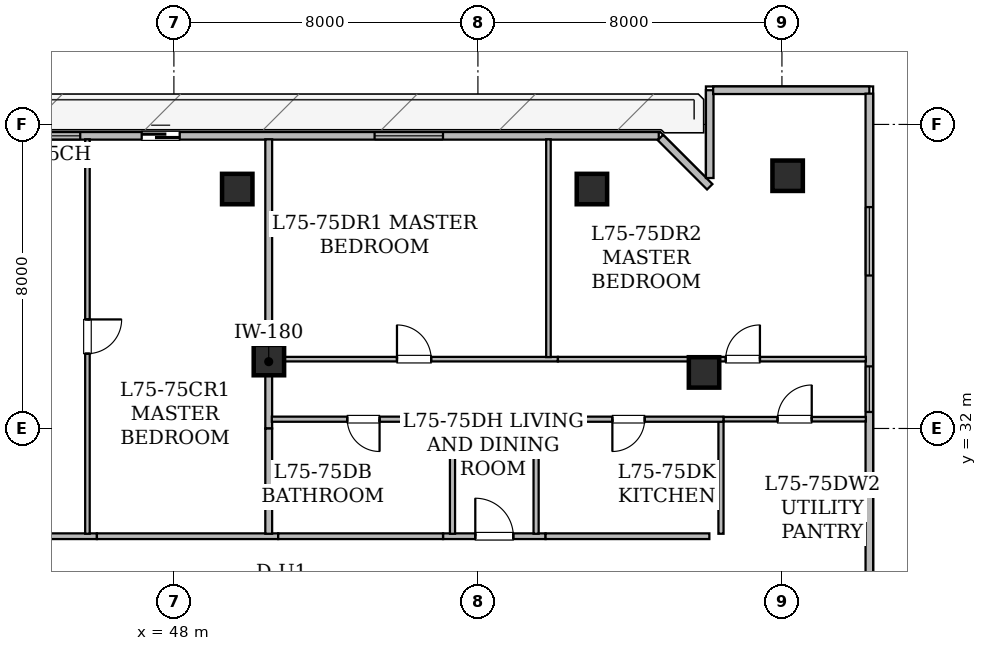
"""IFC4 building model, lengths in metres.
Left out: names, types, materials, properties, quantities, classifications, styles, units other than length and angle.
Written with IfcOpenShell. Run it as: python <this file> out.ifc"""

import sys

from ifc_helpers import new_model, si_unit, direction, frame, frame_2d, origin, origin_2d, place, context, subcontext, project, spatial, rectangle, hollow_rectangle, extrude, element, fill, save


model = new_model("IFC4")
c1 = context("Model", 3, precision=1e-05, world=origin(), true_north=direction((0.0, 1.0)))
c2 = subcontext(c1, "Body", "Model", "MODEL_VIEW")
j1 = project(units=[si_unit("LENGTHUNIT", "METRE"), si_unit("PLANEANGLEUNIT", "RADIAN")], contexts=[c1])
p1 = place(None, origin())
s1 = spatial("IfcSite", under=j1, at=p1, CompositionType="ELEMENT")
p2 = place(p1, origin())
s2 = spatial("IfcBuilding", under=s1, at=p2, CompositionType="ELEMENT")
p3 = place(p2, frame((0.0, 0.0, 294.65)))
s3 = spatial("IfcBuildingStorey", under=s2, at=p3, CompositionType="ELEMENT", Elevation=294.65)
for number, where, z_axis, x_axis in (
    (1, (49.667, 38.3, 0.025), (0.0, 0.0, 1.0), (1.0, 0.0, 0.0)),
    (2, (59.0, 38.3, 0.025), (0.0, 0.0, 1.0), (1.0, 0.0, 0.0)),
    (3, (61.95, 33.475, 0.025), (0.0, 0.0, 1.0), (1.0, 0.0, 0.0)),
):
    element("IfcColumn", number, at=place(p3, frame(where, z_axis=z_axis, x_axis=x_axis)), inside=s3, PredefinedType="COLUMN", context=c2, shape_type="SweptSolid", body=[
        extrude(hollow_rectangle(XDim=0.8, YDim=0.8, WallThickness=0.04, at=origin_2d()), origin(), (0.0, 0.0, 1.0), 4.175),
    ])
p4 = place(p3, frame((50.5, 33.8, 0.0), z_axis=(0.0, 0.0, 1.0), x_axis=(1.0, 0.0, 0.0)))
e4 = element("IfcColumn", 4, at=p4, inside=s3, PredefinedType="COLUMN", context=c2, shape_type="SweptSolid", body=[
    extrude(hollow_rectangle(XDim=0.8, YDim=0.8, WallThickness=0.04, at=origin_2d()), origin(), (0.0, 0.0, 1.0), 4.2),
])
p5 = place(p3, frame((64.15, 38.65, 0.025), z_axis=(0.0, 0.0, 1.0), x_axis=(1.0, 0.0, 0.0)))
e5 = element("IfcColumn", 5, at=p5, inside=s3, PredefinedType="COLUMN", context=c2, shape_type="SweptSolid", body=[
    extrude(hollow_rectangle(XDim=0.8, YDim=0.8, WallThickness=0.04, at=origin_2d()), origin(), (0.0, 0.0, 1.0), 4.175),
])
p6 = place(p3, frame((29.302, 39.7, 0.0), z_axis=(0.0, 0.0, 1.0), x_axis=(1.0, 0.0, 0.0)))
e6 = element("IfcWall", 6, at=p6, inside=s3, PredefinedType="STANDARD", context=c2, shape_type="SweptSolid", body=[
    extrude(rectangle(XDim=31.457, YDim=0.2, at=frame_2d((15.729, 0.0))), origin(), (0.0, 0.0, 1.0), 3.95),
])
p7 = place(p6, frame((17.85, 0.0, 0.0)))
e7 = element("IfcOpeningElement", 7, at=p7, cuts=e6, PredefinedType="OPENING", context=c2, shape_type="SweptSolid", body=[
    extrude(rectangle(XDim=1.0, YDim=2.15, at=frame_2d((0.5, 1.075))), frame((0.0, 0.11, 0.0), z_axis=(0.0, -1.0, 0.0), x_axis=(1.0, 0.0, 0.0)), (0.0, 0.0, 1.0), 0.22),
])
p8 = place(p6, frame((15.033, 0.0, 0.78)))
e8 = element("IfcOpeningElement", 8, at=p8, cuts=e6, PredefinedType="OPENING", context=c2, shape_type="SweptSolid", body=[
    extrude(rectangle(XDim=1.2, YDim=1.5, at=frame_2d((0.6, 0.75))), frame((0.0, 0.11, 0.0), z_axis=(0.0, -1.0, 0.0), x_axis=(1.0, 0.0, 0.0)), (0.0, 0.0, 1.0), 0.22),
])
p9 = place(p6, frame((23.979, 0.0, 0.85)))
e9 = element("IfcOpeningElement", 9, at=p9, cuts=e6, PredefinedType="OPENING", context=c2, shape_type="SweptSolid", body=[
    extrude(rectangle(XDim=1.8, YDim=0.92, at=frame_2d((0.9, 0.46))), frame((0.0, 0.11, 0.0), z_axis=(0.0, -1.0, 0.0), x_axis=(1.0, 0.0, 0.0)), (0.0, 0.0, 1.0), 0.22),
])
p10 = place(p3, frame((60.803, 39.656, 0.0), z_axis=(0.0, 0.0, 1.0), x_axis=(0.707106781187, -0.707106781187, 0.0)))
e10 = element("IfcWall", 10, at=p10, inside=s3, PredefinedType="STANDARD", context=c2, shape_type="SweptSolid", body=[
    extrude(rectangle(XDim=1.834, YDim=0.2, at=frame_2d((0.917, 0.0))), origin(), (0.0, 0.0, 1.0), 3.95),
])
p11 = place(p3, frame((62.1, 38.59, 0.0), z_axis=(0.0, 0.0, 1.0), x_axis=(0.0, 1.0, 0.0)))
e11 = element("IfcWall", 11, at=p11, inside=s3, PredefinedType="STANDARD", context=c2, shape_type="SweptSolid", body=[
    extrude(rectangle(XDim=2.31, YDim=0.2, at=frame_2d((1.155, 0.0))), origin(), (0.0, 0.0, 1.0), 3.95),
])
p12 = place(p3, frame((62.19, 40.9, 0.0), z_axis=(0.0, 0.0, 1.0), x_axis=(1.0, 0.0, 0.0)))
e12 = element("IfcWall", 12, at=p12, inside=s3, PredefinedType="STANDARD", context=c2, shape_type="SweptSolid", body=[
    extrude(rectangle(XDim=4.11, YDim=0.2, at=frame_2d((2.055, 0.0))), origin(), (0.0, 0.0, 1.0), 3.95),
])
p13 = place(p3, frame((66.3, 40.81, 0.0), z_axis=(0.0, 0.0, 1.0), x_axis=(0.0, -1.0, 0.0)))
e13 = element("IfcWall", 13, at=p13, inside=s3, PredefinedType="STANDARD", context=c2, shape_type="SweptSolid", body=[
    extrude(rectangle(XDim=25.71, YDim=0.2, at=frame_2d((12.855, 0.0))), origin(), (0.0, 0.0, 1.0), 3.95),
])
p14 = place(p13, frame((14.784, 0.0, 0.85)))
e14 = element("IfcOpeningElement", 14, at=p14, cuts=e13, PredefinedType="OPENING", context=c2, shape_type="SweptSolid", body=[
    extrude(rectangle(XDim=1.8, YDim=0.92, at=frame_2d((0.9, 0.46))), frame((0.0, 0.11, 0.0), z_axis=(0.0, -1.0, 0.0), x_axis=(1.0, 0.0, 0.0)), (0.0, 0.0, 1.0), 0.22),
])
p15 = place(p13, frame((17.584, 0.0, 0.78)))
e15 = element("IfcOpeningElement", 15, at=p15, cuts=e13, PredefinedType="OPENING", context=c2, shape_type="SweptSolid", body=[
    extrude(rectangle(XDim=1.2, YDim=1.5, at=frame_2d((0.6, 0.75))), frame((0.0, 0.11, 0.0), z_axis=(0.0, -1.0, 0.0), x_axis=(1.0, 0.0, 0.0)), (0.0, 0.0, 1.0), 0.22),
])
p16 = place(p13, frame((21.05, 0.0, 0.85)))
e16 = element("IfcOpeningElement", 16, at=p16, cuts=e13, PredefinedType="OPENING", context=c2, shape_type="SweptSolid", body=[
    extrude(rectangle(XDim=1.8, YDim=0.92, at=frame_2d((0.9, 0.46))), frame((0.0, 0.11, 0.0), z_axis=(0.0, -1.0, 0.0), x_axis=(1.0, 0.0, 0.0)), (0.0, 0.0, 1.0), 0.22),
])
p17 = place(p13, frame((7.176, 0.0, 0.78)))
e17 = element("IfcOpeningElement", 17, at=p17, cuts=e13, PredefinedType="OPENING", context=c2, shape_type="SweptSolid", body=[
    extrude(rectangle(XDim=1.2, YDim=1.5, at=frame_2d((0.6, 0.75))), frame((0.0, 0.11, 0.0), z_axis=(0.0, -1.0, 0.0), x_axis=(1.0, 0.0, 0.0)), (0.0, 0.0, 1.0), 0.22),
])
p18 = place(p13, frame((2.985, 0.0, 0.85)))
e18 = element("IfcOpeningElement", 18, at=p18, cuts=e13, PredefinedType="OPENING", context=c2, shape_type="SweptSolid", body=[
    extrude(rectangle(XDim=1.8, YDim=0.92, at=frame_2d((0.9, 0.46))), frame((0.0, 0.11, 0.0), z_axis=(0.0, -1.0, 0.0), x_axis=(1.0, 0.0, 0.0)), (0.0, 0.0, 1.0), 0.22),
])
p19 = place(p3, frame((43.896, 29.165, 0.0), z_axis=(0.0, 0.0, 1.0), x_axis=(1.0, 0.0, 0.0)))
e19 = element("IfcWall", 19, at=p19, inside=s3, PredefinedType="STANDARD", context=c2, shape_type="SweptSolid", body=[
    extrude(rectangle(XDim=2.078, YDim=0.15, at=frame_2d((1.039, 0.0))), origin(), (0.0, 0.0, 1.0), 3.95),
])
p20 = place(p3, frame((45.974, 29.165, 0.0), z_axis=(0.0, 0.0, 1.0), x_axis=(1.0, 0.0, 0.0)))
e20 = element("IfcWall", 20, at=p20, inside=s3, PredefinedType="STANDARD", context=c2, shape_type="SweptSolid", body=[
    extrude(rectangle(XDim=4.77, YDim=0.15, at=frame_2d((2.385, 0.0))), origin(), (0.0, 0.0, 1.0), 3.245),
])
p21 = place(p3, frame((55.082, 29.165, 0.0), z_axis=(0.0, 0.0, 1.0), x_axis=(1.0, 0.0, 0.0)))
e21 = element("IfcWall", 21, at=p21, inside=s3, PredefinedType="STANDARD", context=c2, shape_type="SweptSolid", body=[
    extrude(rectangle(XDim=2.698, YDim=0.15, at=frame_2d((1.349, 0.0))), origin(), (0.0, 0.0, 1.0), 3.95),
])
p22 = place(p21, frame((0.849, 0.0, 0.0)))
e22 = element("IfcOpeningElement", 22, at=p22, cuts=e21, PredefinedType="OPENING", context=c2, shape_type="SweptSolid", body=[
    extrude(rectangle(XDim=1.0, YDim=2.15, at=frame_2d((0.5, 1.075))), frame((0.0, 0.085, 0.0), z_axis=(0.0, -1.0, 0.0), x_axis=(1.0, 0.0, 0.0)), (0.0, 0.0, 1.0), 0.17),
])
p23 = place(p3, frame((50.744, 29.165, 0.0), z_axis=(0.0, 0.0, 1.0), x_axis=(1.0, 0.0, 0.0)))
e23 = element("IfcWall", 23, at=p23, inside=s3, PredefinedType="STANDARD", context=c2, shape_type="SweptSolid", body=[
    extrude(rectangle(XDim=4.338, YDim=0.15, at=frame_2d((2.169, 0.0))), origin(), (0.0, 0.0, 1.0), 3.95),
])
p24 = place(p3, frame((57.78, 29.165, 0.0), z_axis=(0.0, 0.0, 1.0), x_axis=(1.0, 0.0, 0.0)))
e24 = element("IfcWall", 24, at=p24, inside=s3, PredefinedType="STANDARD", context=c2, shape_type="SweptSolid", body=[
    extrude(rectangle(XDim=4.31, YDim=0.15, at=frame_2d((2.155, 0.0))), origin(), (0.0, 0.0, 1.0), 3.407),
])
p25 = place(p3, frame((45.725, 39.608, 0.0), z_axis=(0.0, 0.0, 1.0), x_axis=(0.0, -1.0, 0.0)))
e25 = element("IfcWall", 25, at=p25, inside=s3, PredefinedType="PARTITIONING", context=c2, shape_type="SweptSolid", body=[
    extrude(rectangle(XDim=10.378, YDim=0.12, at=frame_2d((5.189, 0.0))), origin(), (0.0, 0.0, 1.0), 3.245),
])
p26 = place(p25, frame((4.739, 0.0, 0.0)))
e26 = element("IfcOpeningElement", 26, at=p26, cuts=e25, PredefinedType="OPENING", context=c2, shape_type="SweptSolid", body=[
    extrude(rectangle(XDim=0.9, YDim=2.1, at=frame_2d((0.45, 1.05))), frame((0.0, 0.07, 0.0), z_axis=(0.0, -1.0, 0.0), x_axis=(1.0, 0.0, 0.0)), (0.0, 0.0, 1.0), 0.14),
])
p27 = place(p3, frame((50.495, 34.068, 0.0), z_axis=(0.0, 0.0, 1.0), x_axis=(0.0, -1.0, 0.0)))
e27 = element("IfcWall", 27, at=p27, inside=s3, PredefinedType="STANDARD", context=c2, shape_type="SweptSolid", body=[
    extrude(rectangle(XDim=2.069, YDim=0.18, at=frame_2d((1.035, 0.0))), origin(), (0.0, 0.0, 1.0), 3.245),
])
p28 = place(p3, frame((50.495, 31.999, 0.0), z_axis=(0.0, 0.0, 1.0), x_axis=(0.0, -1.0, 0.0)))
e28 = element("IfcWall", 28, at=p28, inside=s3, PredefinedType="STANDARD", context=c2, shape_type="SweptSolid", body=[
    extrude(rectangle(XDim=2.769, YDim=0.18, at=frame_2d((1.385, 0.0))), origin(), (0.0, 0.0, 1.0), 3.245),
])
p29 = place(p3, frame((50.495, 39.608, 0.0), z_axis=(0.0, 0.0, 1.0), x_axis=(0.0, -1.0, 0.0)))
e29 = element("IfcWall", 29, at=p29, inside=s3, PredefinedType="STANDARD", context=c2, shape_type="SweptSolid", body=[
    extrude(rectangle(XDim=5.54, YDim=0.18, at=frame_2d((2.77, 0.0))), origin(), (0.0, 0.0, 1.0), 3.245),
])
p30 = place(p3, frame((62.461, 32.244, 0.0), z_axis=(0.0, 0.0, 1.0), x_axis=(1.0, 0.0, 0.0)))
e30 = element("IfcWall", 30, at=p30, inside=s3, PredefinedType="PARTITIONING", context=c2, shape_type="SweptSolid", body=[
    extrude(rectangle(XDim=3.747, YDim=0.12, at=frame_2d((1.874, 0.0))), origin(), (0.0, 0.0, 1.0), 3.245),
])
p31 = place(p30, frame((1.423, 0.0, 0.0)))
e31 = element("IfcOpeningElement", 31, at=p31, cuts=e30, PredefinedType="OPENING", context=c2, shape_type="SweptSolid", body=[
    extrude(rectangle(XDim=0.9, YDim=2.1, at=frame_2d((0.45, 1.05))), frame((0.0, 0.07, 0.0), z_axis=(0.0, -1.0, 0.0), x_axis=(1.0, 0.0, 0.0)), (0.0, 0.0, 1.0), 0.14),
])
p32 = place(p3, frame((62.396, 29.23, 0.0), z_axis=(0.0, 0.0, 1.0), x_axis=(0.0, 1.0, 0.0)))
e32 = element("IfcWall", 32, at=p32, inside=s3, PredefinedType="PARTITIONING", context=c2, shape_type="SweptSolid", body=[
    extrude(rectangle(XDim=2.949, YDim=0.135, at=frame_2d((1.475, 0.0))), origin(), (0.0, 0.0, 1.0), 3.95),
])
p33 = place(p3, frame((55.331, 29.23, 0.0), z_axis=(0.0, 0.0, 1.0), x_axis=(0.0, 1.0, 0.0)))
e33 = element("IfcWall", 33, at=p33, inside=s3, PredefinedType="PARTITIONING", context=c2, shape_type="SweptSolid", body=[
    extrude(rectangle(XDim=3.079, YDim=0.135, at=frame_2d((1.54, 0.0))), origin(), (0.0, 0.0, 1.0), 3.95),
])
p34 = place(p3, frame((55.396, 32.244, 0.0), z_axis=(0.0, 0.0, 1.0), x_axis=(-1.0, 0.0, 0.0)))
e34 = element("IfcWall", 34, at=p34, inside=s3, PredefinedType="PARTITIONING", context=c2, shape_type="SweptSolid", body=[
    extrude(rectangle(XDim=4.819, YDim=0.135, at=frame_2d((2.41, 0.0))), origin(), (0.0, 0.0, 1.0), 3.245),
])
p35 = place(p34, frame((1.984, 0.0, 0.0)))
e35 = element("IfcOpeningElement", 35, at=p35, cuts=e34, PredefinedType="OPENING", context=c2, shape_type="SweptSolid", body=[
    extrude(rectangle(XDim=0.85, YDim=2.1, at=frame_2d((0.425, 1.05))), frame((0.0, 0.077, 0.0), z_axis=(0.0, -1.0, 0.0), x_axis=(1.0, 0.0, 0.0)), (0.0, 0.0, 1.0), 0.155),
])
p36 = place(p3, frame((62.461, 32.244, 0.0), z_axis=(0.0, 0.0, 1.0), x_axis=(-1.0, 0.0, 0.0)))
e36 = element("IfcWall", 36, at=p36, inside=s3, PredefinedType="PARTITIONING", context=c2, shape_type="SweptSolid", body=[
    extrude(rectangle(XDim=4.995, YDim=0.135, at=frame_2d((2.498, 0.0))), origin(), (0.0, 0.0, 1.0), 3.407),
])
p37 = place(p36, frame((2.073, 0.0, 0.0)))
e37 = element("IfcOpeningElement", 37, at=p37, cuts=e36, PredefinedType="OPENING", context=c2, shape_type="SweptSolid", body=[
    extrude(rectangle(XDim=0.85, YDim=2.1, at=frame_2d((0.425, 1.05))), frame((0.0, 0.077, 0.0), z_axis=(0.0, -1.0, 0.0), x_axis=(1.0, 0.0, 0.0)), (0.0, 0.0, 1.0), 0.155),
])
p38 = place(p3, frame((57.531, 32.309, 0.0), z_axis=(0.0, 0.0, 1.0), x_axis=(0.0, -1.0, 0.0)))
e38 = element("IfcWall", 38, at=p38, inside=s3, PredefinedType="PARTITIONING", context=c2, shape_type="SweptSolid", body=[
    extrude(rectangle(XDim=3.079, YDim=0.135, at=frame_2d((1.54, 0.0))), origin(), (0.0, 0.0, 1.0), 3.95),
])
p39 = place(p3, frame((50.577, 33.824, 0.0), z_axis=(0.0, 0.0, 1.0), x_axis=(1.0, 0.0, 0.0)))
e39 = element("IfcWall", 39, at=p39, inside=s3, PredefinedType="PARTITIONING", context=c2, shape_type="SweptSolid", body=[
    extrude(rectangle(XDim=7.528, YDim=0.12, at=frame_2d((3.764, 0.0))), origin(), (0.0, 0.0, 1.0), 3.245),
])
p40 = place(p39, frame((3.293, 0.0, 0.0)))
e40 = element("IfcOpeningElement", 40, at=p40, cuts=e39, PredefinedType="OPENING", context=c2, shape_type="SweptSolid", body=[
    extrude(rectangle(XDim=0.9, YDim=2.1, at=frame_2d((0.45, 1.05))), frame((0.0, 0.07, 0.0), z_axis=(0.0, -1.0, 0.0), x_axis=(1.0, 0.0, 0.0)), (0.0, 0.0, 1.0), 0.14),
])
p41 = place(p3, frame((58.105, 33.824, 0.0), z_axis=(0.0, 0.0, 1.0), x_axis=(1.0, 0.0, 0.0)))
e41 = element("IfcWall", 41, at=p41, inside=s3, PredefinedType="PARTITIONING", context=c2, shape_type="SweptSolid", body=[
    extrude(rectangle(XDim=8.103, YDim=0.12, at=frame_2d((4.052, 0.0))), origin(), (0.0, 0.0, 1.0), 3.245),
])
p42 = place(p41, frame((4.416, 0.0, 0.0)))
e42 = element("IfcOpeningElement", 42, at=p42, cuts=e41, PredefinedType="OPENING", context=c2, shape_type="SweptSolid", body=[
    extrude(rectangle(XDim=0.9, YDim=2.1, at=frame_2d((0.45, 1.05))), frame((0.0, 0.07, 0.0), z_axis=(0.0, -1.0, 0.0), x_axis=(1.0, 0.0, 0.0)), (0.0, 0.0, 1.0), 0.14),
])
p43 = place(p3, frame((57.856, 39.608, 0.0), z_axis=(0.0, 0.0, 1.0), x_axis=(0.0, -1.0, 0.0)))
e43 = element("IfcWall", 43, at=p43, inside=s3, PredefinedType="PARTITIONING", context=c2, shape_type="SweptSolid", body=[
    extrude(rectangle(XDim=5.73, YDim=0.12, at=frame_2d((2.865, 0.0))), origin(), (0.0, 0.0, 1.0), 3.245),
])
p44 = place(p7, origin())
e44 = element("IfcDoor", 44, at=p44, inside=s3, OperationType="SLIDING_TO_LEFT", PredefinedType="DOOR", context=c2, shape_type="SweptSolid", body=[
    extrude(rectangle(XDim=1.0, YDim=2.15, at=frame_2d((0.5, 1.075))), frame((0.0, 0.025, 0.0), z_axis=(0.0, -1.0, 0.0), x_axis=(1.0, 0.0, 0.0)), (0.0, 0.0, 1.0), 0.05),
])
fill(e7, e44)
p45 = place(p8, origin())
e45 = element("IfcWindow", 45, at=p45, inside=s3, PartitioningType="SINGLE_PANEL", PredefinedType="WINDOW", context=c2, shape_type="SweptSolid", body=[
    extrude(rectangle(XDim=1.2, YDim=1.5, at=frame_2d((0.6, 0.75))), frame((0.0, 0.03, 0.0), z_axis=(0.0, -1.0, 0.0), x_axis=(1.0, 0.0, 0.0)), (0.0, 0.0, 1.0), 0.06),
])
fill(e8, e45)
p46 = place(p17, origin())
e46 = element("IfcWindow", 46, at=p46, inside=s3, PartitioningType="SINGLE_PANEL", PredefinedType="WINDOW", context=c2, shape_type="SweptSolid", body=[
    extrude(rectangle(XDim=1.2, YDim=1.5, at=frame_2d((0.6, 0.75))), frame((0.0, 0.03, 0.0), z_axis=(0.0, -1.0, 0.0), x_axis=(1.0, 0.0, 0.0)), (0.0, 0.0, 1.0), 0.06),
])
fill(e17, e46)
p47 = place(p9, origin())
e47 = element("IfcWindow", 47, at=p47, inside=s3, PartitioningType="SINGLE_PANEL", PredefinedType="WINDOW", context=c2, shape_type="SweptSolid", body=[
    extrude(rectangle(XDim=1.8, YDim=0.92, at=frame_2d((0.9, 0.46))), frame((0.0, 0.03, 0.0), z_axis=(0.0, -1.0, 0.0), x_axis=(1.0, 0.0, 0.0)), (0.0, 0.0, 1.0), 0.06),
])
fill(e9, e47)
p48 = place(p18, origin())
e48 = element("IfcWindow", 48, at=p48, inside=s3, PartitioningType="SINGLE_PANEL", PredefinedType="WINDOW", context=c2, shape_type="SweptSolid", body=[
    extrude(rectangle(XDim=1.8, YDim=0.92, at=frame_2d((0.9, 0.46))), frame((0.0, 0.03, 0.0), z_axis=(0.0, -1.0, 0.0), x_axis=(1.0, 0.0, 0.0)), (0.0, 0.0, 1.0), 0.06),
])
fill(e18, e48)
p49 = place(p22, origin())
e49 = element("IfcDoor", 49, at=p49, inside=s3, OperationType="SINGLE_SWING_LEFT", PredefinedType="DOOR", context=c2, shape_type="SweptSolid", body=[
    extrude(rectangle(XDim=1.0, YDim=2.15, at=frame_2d((0.5, 1.075))), frame((0.0, 0.025, 0.0), z_axis=(0.0, -1.0, 0.0), x_axis=(1.0, 0.0, 0.0)), (0.0, 0.0, 1.0), 0.05),
])
fill(e22, e49)
p50 = place(p26, origin())
e50 = element("IfcDoor", 50, at=p50, inside=s3, OperationType="SINGLE_SWING_LEFT", PredefinedType="DOOR", context=c2, shape_type="SweptSolid", body=[
    extrude(rectangle(XDim=0.9, YDim=2.1, at=frame_2d((0.45, 1.05))), frame((0.0, 0.025, 0.0), z_axis=(0.0, -1.0, 0.0), x_axis=(1.0, 0.0, 0.0)), (0.0, 0.0, 1.0), 0.05),
])
fill(e26, e50)
p51 = place(p31, origin())
e51 = element("IfcDoor", 51, at=p51, inside=s3, OperationType="SINGLE_SWING_RIGHT", PredefinedType="DOOR", context=c2, shape_type="SweptSolid", body=[
    extrude(rectangle(XDim=0.9, YDim=2.1, at=frame_2d((0.45, 1.05))), frame((0.0, 0.025, 0.0), z_axis=(0.0, -1.0, 0.0), x_axis=(1.0, 0.0, 0.0)), (0.0, 0.0, 1.0), 0.05),
])
fill(e31, e51)
p52 = place(p35, origin())
e52 = element("IfcDoor", 52, at=p52, inside=s3, OperationType="SINGLE_SWING_LEFT", PredefinedType="DOOR", context=c2, shape_type="SweptSolid", body=[
    extrude(rectangle(XDim=0.85, YDim=2.1, at=frame_2d((0.425, 1.05))), frame((0.0, 0.025, 0.0), z_axis=(0.0, -1.0, 0.0), x_axis=(1.0, 0.0, 0.0)), (0.0, 0.0, 1.0), 0.05),
])
fill(e35, e52)
p53 = place(p37, origin())
e53 = element("IfcDoor", 53, at=p53, inside=s3, OperationType="SINGLE_SWING_RIGHT", PredefinedType="DOOR", context=c2, shape_type="SweptSolid", body=[
    extrude(rectangle(XDim=0.85, YDim=2.1, at=frame_2d((0.425, 1.05))), frame((0.0, 0.025, 0.0), z_axis=(0.0, -1.0, 0.0), x_axis=(1.0, 0.0, 0.0)), (0.0, 0.0, 1.0), 0.05),
])
fill(e37, e53)
p54 = place(p40, origin())
e54 = element("IfcDoor", 54, at=p54, inside=s3, OperationType="SINGLE_SWING_LEFT", PredefinedType="DOOR", context=c2, shape_type="SweptSolid", body=[
    extrude(rectangle(XDim=0.9, YDim=2.1, at=frame_2d((0.45, 1.05))), frame((0.0, 0.025, 0.0), z_axis=(0.0, -1.0, 0.0), x_axis=(1.0, 0.0, 0.0)), (0.0, 0.0, 1.0), 0.05),
])
fill(e40, e54)
p55 = place(p42, origin())
e55 = element("IfcDoor", 55, at=p55, inside=s3, OperationType="SINGLE_SWING_RIGHT", PredefinedType="DOOR", context=c2, shape_type="SweptSolid", body=[
    extrude(rectangle(XDim=0.9, YDim=2.1, at=frame_2d((0.45, 1.05))), frame((0.0, 0.025, 0.0), z_axis=(0.0, -1.0, 0.0), x_axis=(1.0, 0.0, 0.0)), (0.0, 0.0, 1.0), 0.05),
])
fill(e42, e55)
save(model, sys.argv[1])
